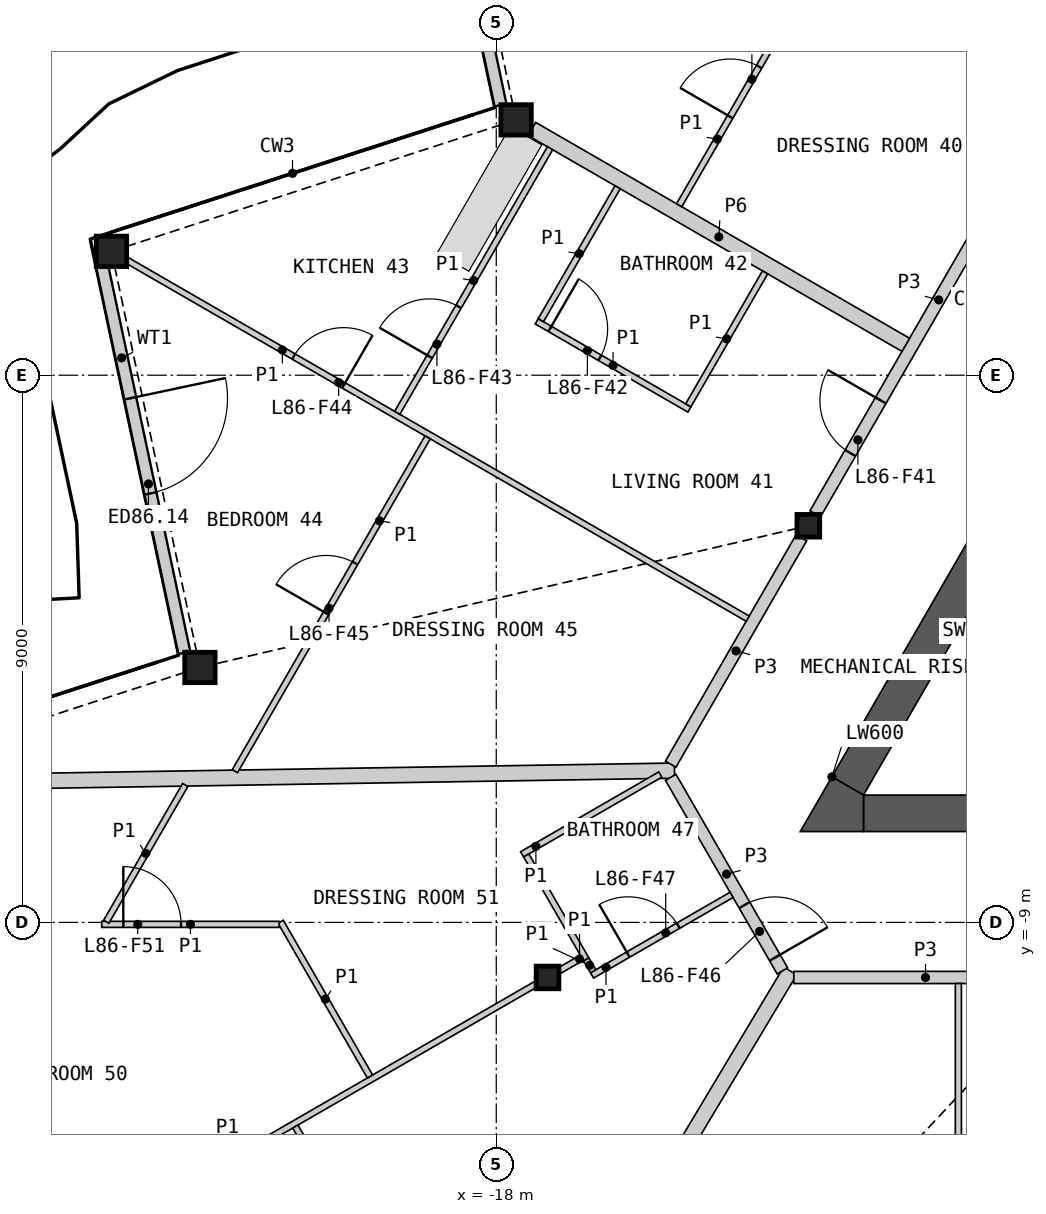
"""IFC4 building model, lengths in metres.
Left out: names, types, materials, properties, quantities, classifications, styles, units other than length and angle.
Written with IfcOpenShell. Run it as: python <this file> out.ifc"""

import sys

from ifc_helpers import new_model, si_unit, direction, frame, frame_2d, origin, origin_2d, place, context, subcontext, project, spatial, polyline, rectangle, hollow_rectangle, i_section, outline, extrude, element, fill, save


model = new_model("IFC4")
c1 = context("Model", 3, precision=1e-05, world=origin(), true_north=direction((0.0, 1.0)))
c2 = subcontext(c1, "Body", "Model", "MODEL_VIEW")
j1 = project(units=[si_unit("LENGTHUNIT", "METRE"), si_unit("PLANEANGLEUNIT", "RADIAN")], contexts=[c1])
p1 = place(None, origin())
s1 = spatial("IfcSite", under=j1, at=p1, CompositionType="ELEMENT")
p2 = place(p1, origin())
s2 = spatial("IfcBuilding", under=s1, at=p2, CompositionType="ELEMENT")
p3 = place(p2, frame((0.0, 0.0, 381.4)))
s3 = spatial("IfcBuildingStorey", under=s2, at=p3, CompositionType="ELEMENT", Elevation=381.4)
for number, where, z_axis, x_axis in (
    (1, (-17.674, 4.199, 0.0), (0.0, 0.0, 1.0), (1.0, 0.0, 0.0)),
    (2, (-24.329, 2.037, 0.0), (0.0, 0.0, 1.0), (1.0, 0.0, 0.0)),
    (3, (-22.874, -4.807, 0.0), (0.0, 0.0, 1.0), (1.0, 0.0, 0.0)),
):
    element("IfcColumn", number, at=place(p3, frame(where, z_axis=z_axis, x_axis=x_axis)), inside=s3, PredefinedType="COLUMN", context=c2, shape_type="SweptSolid", body=[
        extrude(hollow_rectangle(XDim=0.5, YDim=0.5, WallThickness=0.03, at=origin_2d()), origin(), (0.0, 0.0, 1.0), 3.4),
    ])
for number, where, z_axis, x_axis in (
    (4, (-12.868, -2.476, 0.0), (0.0, 0.0, 1.0), (1.0, 0.0, 0.0)),
    (5, (-17.157, -9.906, 0.0), (0.0, 0.0, 1.0), (1.0, 0.0, 0.0)),
):
    element("IfcColumn", number, at=place(p3, frame(where, z_axis=z_axis, x_axis=x_axis)), inside=s3, PredefinedType="COLUMN", context=c2, shape_type="SweptSolid", body=[
        extrude(i_section(OverallWidth=0.374, OverallDepth=0.372, WebThickness=0.016, FlangeThickness=0.026, at=origin_2d()), origin(), (0.0, 0.0, 1.0), 3.4),
    ])
p4 = place(p3, frame((-19.304, 10.909, 0.0), z_axis=(0.0, 0.0, 1.0), x_axis=(0.207882161022, -0.97815387702, 0.0)))
e6 = element("IfcWall", 6, at=p4, inside=s3, PredefinedType="SOLIDWALL", context=c2, shape_type="SweptSolid", body=[
    extrude(rectangle(XDim=6.612, YDim=0.2, at=frame_2d((3.306, 0.0))), origin(), (0.0, 0.0, 1.0), 2.634),
])
p5 = place(p4, frame((2.333, 0.0, 0.0)))
e7 = element("IfcOpeningElement", 7, at=p5, cuts=e6, PredefinedType="OPENING", context=c2, shape_type="SweptSolid", body=[
    extrude(rectangle(XDim=1.6, YDim=2.25, at=frame_2d((0.8, 1.125))), frame((0.0, 0.11, 0.0), z_axis=(0.0, -1.0, 0.0), x_axis=(1.0, 0.0, 0.0)), (0.0, 0.0, 1.0), 0.22),
])
p6 = place(p3, frame((-24.505, 1.902, 0.0), z_axis=(0.0, 0.0, 1.0), x_axis=(0.207917488951, -0.978146368285, 0.0)))
e8 = element("IfcWall", 8, at=p6, inside=s3, PredefinedType="SOLIDWALL", context=c2, shape_type="SweptSolid", body=[
    extrude(rectangle(XDim=6.612, YDim=0.2, at=frame_2d((3.306, 0.0))), origin(), (0.0, 0.0, 1.0), 2.634),
])
p7 = place(p6, frame((2.333, 0.0, 0.0)))
e9 = element("IfcOpeningElement", 9, at=p7, cuts=e8, PredefinedType="OPENING", context=c2, shape_type="SweptSolid", body=[
    extrude(rectangle(XDim=1.6, YDim=2.25, at=frame_2d((0.8, 1.125))), frame((0.0, 0.11, 0.0), z_axis=(0.0, -1.0, 0.0), x_axis=(1.0, 0.0, 0.0)), (0.0, 0.0, 1.0), 0.22),
])
p8 = place(p3, origin())
e10 = element("IfcWall", 10, at=p8, inside=s3, PredefinedType="SHEAR", context=c2, shape_type="SweptSolid", body=[
    extrude(outline(polyline([(-5.307, -1.281), (-10.374, -4.206), (-10.032, -4.298), (-5.182, -1.498), (-5.307, -1.281)])), origin(), (0.0, 0.0, 1.0), 3.1),
])
p9 = place(p3, origin())
e11 = element("IfcWall", 11, at=p9, inside=s3, PredefinedType="SHEAR", context=c2, shape_type="SweptSolid", body=[
    extrude(outline(polyline([(-10.374, -4.206), (-8.83, -6.881), (-8.738, -6.539), (-10.032, -4.298), (-10.374, -4.206)])), origin(), (0.0, 0.0, 1.0), 3.1),
])
p10 = place(p3, frame((-11.961, -7.206, 0.0), z_axis=(0.0, 0.0, 1.0), x_axis=(1.0, 0.0, 0.0)))
e12 = element("IfcWall", 12, at=p10, inside=s3, PredefinedType="SHEAR", context=c2, shape_type="SweptSolid", body=[
    extrude(rectangle(XDim=4.868, YDim=0.6, at=frame_2d((2.434, 0.0))), origin(), (0.0, 0.0, 1.0), 3.1),
])
p11 = place(p3, frame((-9.562, -2.15, 0.0), z_axis=(0.0, 0.0, 1.0), x_axis=(-0.500015214976, -0.866016619236, 0.0)))
e13 = element("IfcWall", 13, at=p11, inside=s3, PredefinedType="SHEAR", context=c2, shape_type="SweptSolid", body=[
    extrude(rectangle(XDim=5.318, YDim=0.6, at=frame_2d((2.659, 0.0))), origin(), (0.0, 0.0, 1.0), 3.1),
])
p12 = place(p3, origin())
e14 = element("IfcWall", 14, at=p12, inside=s3, PredefinedType="SHEAR", context=c2, shape_type="SweptSolid", body=[
    extrude(outline(polyline([(-12.48, -6.606), (-11.961, -6.906), (-11.961, -7.506), (-13.0, -7.506), (-12.48, -6.606)])), origin(), (0.0, 0.0, 1.0), 3.1),
])
p13 = place(p3, frame((-20.338, -21.771, 0.0), z_axis=(0.0, 0.0, 1.0), x_axis=(0.513878217441, 0.857863146218, 0.0)))
e15 = element("IfcWall", 15, at=p13, inside=s3, PredefinedType="PARTITIONING", context=c2, shape_type="SweptSolid", body=[
    extrude(rectangle(XDim=13.956, YDim=0.25, at=frame_2d((6.978, 0.0))), origin(), (0.0, 0.0, 1.0), 2.33),
])
p14 = place(p3, frame((-29.269, -6.732, 0.0), z_axis=(0.0, 0.0, 1.0), x_axis=(0.999870533117, 0.016090898164, 0.0)))
e16 = element("IfcWall", 16, at=p14, inside=s3, PredefinedType="PARTITIONING", context=c2, shape_type="SweptSolid", body=[
    extrude(rectangle(XDim=14.202, YDim=0.25, at=frame_2d((7.101, 0.0))), origin(), (0.0, 0.0, 1.0), 2.33),
])
p15 = place(p3, frame((-12.754, -2.279, 0.0), z_axis=(0.0, 0.0, 1.0), x_axis=(0.500001682468, 0.866024432409, 0.0)))
e17 = element("IfcWall", 17, at=p15, inside=s3, PredefinedType="PARTITIONING", context=c2, shape_type="SweptSolid", body=[
    extrude(rectangle(XDim=8.124, YDim=0.2, at=frame_2d((4.062, 0.0))), origin(), (0.0, 0.0, 1.0), 3.1),
])
p16 = place(p15, frame((1.153, 0.0, 0.0)))
e18 = element("IfcOpeningElement", 18, at=p16, cuts=e17, PredefinedType="OPENING", context=c2, shape_type="SweptSolid", body=[
    extrude(rectangle(XDim=1.0, YDim=2.1, at=frame_2d((0.5, 1.05))), frame((0.0, 0.11, 0.0), z_axis=(0.0, -1.0, 0.0), x_axis=(1.0, 0.0, 0.0)), (0.0, 0.0, 1.0), 0.22),
])
p17 = place(p3, frame((-17.414, 4.049, 0.0), z_axis=(0.0, 0.0, 1.0), x_axis=(0.866033839264, -0.499985389037, 0.0)))
e19 = element("IfcWall", 19, at=p17, inside=s3, PredefinedType="PARTITIONING", context=c2, shape_type="SweptSolid", body=[
    extrude(rectangle(XDim=7.1, YDim=0.25, at=frame_2d((3.55, 0.0))), origin(), (0.0, 0.0, 1.0), 2.33),
])
p18 = place(p3, frame((-13.106, -9.906, 0.0), z_axis=(0.0, 0.0, 1.0), x_axis=(1.0, 0.0, 0.0)))
e20 = element("IfcWall", 20, at=p18, inside=s3, PredefinedType="PARTITIONING", context=c2, shape_type="SweptSolid", body=[
    extrude(rectangle(XDim=4.331, YDim=0.2, at=frame_2d((2.165, 0.0))), origin(), (0.0, 0.0, 1.0), 3.1),
])
p19 = place(p3, frame((-15.131, -6.397, 0.0), z_axis=(0.0, 0.0, 1.0), x_axis=(0.499986217557, 0.866033360935, 0.0)))
e21 = element("IfcWall", 21, at=p19, inside=s3, PredefinedType="PARTITIONING", context=c2, shape_type="SweptSolid", body=[
    extrude(rectangle(XDim=4.3, YDim=0.2, at=frame_2d((2.15, 0.0))), origin(), (0.0, 0.0, 1.0), 3.1),
])
p20 = place(p3, frame((-15.131, -6.614, 0.0), z_axis=(0.0, 0.0, 1.0), x_axis=(0.499967746641, -0.866044024469, 0.0)))
e22 = element("IfcWall", 22, at=p20, inside=s3, PredefinedType="PARTITIONING", context=c2, shape_type="SweptSolid", body=[
    extrude(rectangle(XDim=3.676, YDim=0.2, at=frame_2d((1.838, 0.0))), origin(), (0.0, 0.0, 1.0), 3.1),
])
p21 = place(p20, frame((2.426, 0.0, 0.0)))
e23 = element("IfcOpeningElement", 23, at=p21, cuts=e22, PredefinedType="OPENING", context=c2, shape_type="SweptSolid", body=[
    extrude(rectangle(XDim=1.0, YDim=2.1, at=frame_2d((0.5, 1.05))), frame((0.0, 0.11, 0.0), z_axis=(0.0, -1.0, 0.0), x_axis=(1.0, 0.0, 0.0)), (0.0, 0.0, 1.0), 0.22),
])
p22 = place(p3, frame((-10.4, -21.828, 0.0), z_axis=(0.0, 0.0, 1.0), x_axis=(0.0, 1.0, 0.0)))
e24 = element("IfcWall", 24, at=p22, inside=s3, PredefinedType="PARTITIONING", context=c2, shape_type="SweptSolid", body=[
    extrude(rectangle(XDim=11.822, YDim=0.1, at=frame_2d((5.911, 0.0))), origin(), (0.0, 0.0, 1.0), 2.33),
])
p23 = place(p22, frame((1.156, 0.0, 0.0)))
e25 = element("IfcOpeningElement", 25, at=p23, cuts=e24, PredefinedType="OPENING", context=c2, shape_type="SweptSolid", body=[
    extrude(rectangle(XDim=0.95, YDim=2.1, at=frame_2d((0.475, 1.05))), frame((0.0, 0.06, 0.0), z_axis=(0.0, -1.0, 0.0), x_axis=(1.0, 0.0, 0.0)), (0.0, 0.0, 1.0), 0.12),
])
p24 = place(p3, frame((-24.069, 1.887, 0.0), z_axis=(0.0, 0.0, 1.0), x_axis=(0.866023404247, -0.500003463284, 0.0)))
e26 = element("IfcWall", 26, at=p24, inside=s3, PredefinedType="PARTITIONING", context=c2, shape_type="SweptSolid", body=[
    extrude(rectangle(XDim=11.782, YDim=0.1, at=frame_2d((5.891, 0.0))), origin(), (0.0, 0.0, 1.0), 2.33),
])
p25 = place(p24, frame((3.159, 0.0, 0.0)))
e27 = element("IfcOpeningElement", 27, at=p25, cuts=e26, PredefinedType="OPENING", context=c2, shape_type="SweptSolid", body=[
    extrude(rectangle(XDim=0.95, YDim=2.1, at=frame_2d((0.475, 1.05))), frame((0.0, 0.06, 0.0), z_axis=(0.0, -1.0, 0.0), x_axis=(1.0, 0.0, 0.0)), (0.0, 0.0, 1.0), 0.12),
])
p26 = place(p3, frame((-18.869, 10.894, 0.0), z_axis=(0.0, 0.0, 1.0), x_axis=(0.866023724155, -0.500002909193, 0.0)))
e28 = element("IfcWall", 28, at=p26, inside=s3, PredefinedType="PARTITIONING", context=c2, shape_type="SweptSolid", body=[
    extrude(rectangle(XDim=11.655, YDim=0.1, at=frame_2d((5.827, 0.0))), origin(), (0.0, 0.0, 1.0), 2.33),
])
p27 = place(p26, frame((6.253, 0.0, 0.0)))
e29 = element("IfcOpeningElement", 29, at=p27, cuts=e28, PredefinedType="OPENING", context=c2, shape_type="SweptSolid", body=[
    extrude(rectangle(XDim=0.95, YDim=2.1, at=frame_2d((0.475, 1.05))), frame((0.0, 0.06, 0.0), z_axis=(0.0, -1.0, 0.0), x_axis=(1.0, 0.0, 0.0)), (0.0, 0.0, 1.0), 0.12),
])
p28 = place(p3, frame((-26.777, -15.46, 0.0), z_axis=(0.0, 0.0, 1.0), x_axis=(0.866019680922, 0.500009912158, 0.0)))
e30 = element("IfcWall", 30, at=p28, inside=s3, PredefinedType="PARTITIONING", context=c2, shape_type="SweptSolid", body=[
    extrude(rectangle(XDim=10.881, YDim=0.1, at=frame_2d((5.44, 0.0))), origin(), (0.0, 0.0, 1.0), 2.33),
])
p29 = place(p28, frame((1.454, 0.0, 0.0)))
e31 = element("IfcOpeningElement", 31, at=p29, cuts=e30, PredefinedType="OPENING", context=c2, shape_type="SweptSolid", body=[
    extrude(rectangle(XDim=0.95, YDim=2.1, at=frame_2d((0.475, 1.05))), frame((0.0, 0.06, 0.0), z_axis=(0.0, -1.0, 0.0), x_axis=(1.0, 0.0, 0.0)), (0.0, 0.0, 1.0), 0.12),
])
p30 = place(p3, frame((-21.304, -12.358, 0.0), z_axis=(0.0, 0.0, 1.0), x_axis=(0.500000558108, -0.866025081561, 0.0)))
e32 = element("IfcWall", 32, at=p30, inside=s3, PredefinedType="PARTITIONING", context=c2, shape_type="SweptSolid", body=[
    extrude(rectangle(XDim=6.358, YDim=0.1, at=frame_2d((3.179, 0.0))), origin(), (0.0, 0.0, 1.0), 2.33),
])
p31 = place(p30, frame((3.555, 0.0, 0.0)))
e33 = element("IfcOpeningElement", 33, at=p31, cuts=e32, PredefinedType="OPENING", context=c2, shape_type="SweptSolid", body=[
    extrude(rectangle(XDim=0.95, YDim=2.1, at=frame_2d((0.475, 1.05))), frame((0.0, 0.06, 0.0), z_axis=(0.0, -1.0, 0.0), x_axis=(1.0, 0.0, 0.0)), (0.0, 0.0, 1.0), 0.12),
])
p32 = place(p3, frame((-22.298, -6.512, 0.0), z_axis=(0.0, 0.0, 1.0), x_axis=(0.499991387631, 0.866030376081, 0.0)))
e34 = element("IfcWall", 34, at=p32, inside=s3, PredefinedType="PARTITIONING", context=c2, shape_type="SweptSolid", body=[
    extrude(rectangle(XDim=6.339, YDim=0.1, at=frame_2d((3.169, 0.0))), origin(), (0.0, 0.0, 1.0), 2.33),
])
p33 = place(p32, frame((3.0, 0.0, 0.0)))
e35 = element("IfcOpeningElement", 35, at=p33, cuts=e34, PredefinedType="OPENING", context=c2, shape_type="SweptSolid", body=[
    extrude(rectangle(XDim=0.95, YDim=2.1, at=frame_2d((0.475, 1.05))), frame((0.0, 0.06, 0.0), z_axis=(0.0, -1.0, 0.0), x_axis=(1.0, 0.0, 0.0)), (0.0, 0.0, 1.0), 0.12),
])
p34 = place(p3, frame((-19.628, -0.619, 0.0), z_axis=(0.0, 0.0, 1.0), x_axis=(0.499990214365, 0.86603105345, 0.0)))
e36 = element("IfcWall", 36, at=p34, inside=s3, PredefinedType="PARTITIONING", context=c2, shape_type="SweptSolid", body=[
    extrude(rectangle(XDim=5.025, YDim=0.1, at=frame_2d((2.512, 0.0))), origin(), (0.0, 0.0, 1.0), 2.33),
])
p35 = place(p34, frame((1.067, 0.0, 0.0)))
e37 = element("IfcOpeningElement", 37, at=p35, cuts=e36, PredefinedType="OPENING", context=c2, shape_type="SweptSolid", body=[
    extrude(rectangle(XDim=0.95, YDim=2.1, at=frame_2d((0.475, 1.05))), frame((0.0, 0.06, 0.0), z_axis=(0.0, -1.0, 0.0), x_axis=(1.0, 0.0, 0.0)), (0.0, 0.0, 1.0), 0.12),
])
p36 = place(p3, frame((-14.992, 2.796, 0.0), z_axis=(0.0, 0.0, 1.0), x_axis=(0.499990214365, 0.86603105345, 0.0)))
e38 = element("IfcWall", 38, at=p36, inside=s3, PredefinedType="PARTITIONING", context=c2, shape_type="SweptSolid", body=[
    extrude(rectangle(XDim=5.025, YDim=0.1, at=frame_2d((2.512, 0.0))), origin(), (0.0, 0.0, 1.0), 2.33),
])
p37 = place(p36, frame((1.68, 0.0, 0.0)))
e39 = element("IfcOpeningElement", 39, at=p37, cuts=e38, PredefinedType="OPENING", context=c2, shape_type="SweptSolid", body=[
    extrude(rectangle(XDim=0.95, YDim=2.1, at=frame_2d((0.475, 1.05))), frame((0.0, 0.06, 0.0), z_axis=(0.0, -1.0, 0.0), x_axis=(1.0, 0.0, 0.0)), (0.0, 0.0, 1.0), 0.12),
])
p38 = place(p3, frame((-21.546, -8.989, 0.0), z_axis=(0.0, 0.0, 1.0), x_axis=(0.499919039967, -0.866072141036, 0.0)))
e40 = element("IfcWall", 40, at=p38, inside=s3, PredefinedType="PARTITIONING", context=c2, shape_type="SweptSolid", body=[
    extrude(rectangle(XDim=2.938, YDim=0.1, at=frame_2d((1.469, 0.0))), origin(), (0.0, 0.0, 1.0), 2.33),
])
p39 = place(p3, frame((-24.489, -9.032, 0.0), z_axis=(0.0, 0.0, 1.0), x_axis=(1.0, 0.0, 0.0)))
e41 = element("IfcWall", 41, at=p39, inside=s3, PredefinedType="PARTITIONING", context=c2, shape_type="SweptSolid", body=[
    extrude(rectangle(XDim=2.917, YDim=0.1, at=frame_2d((1.459, 0.0))), origin(), (0.0, 0.0, 1.0), 2.33),
])
p40 = place(p39, frame((0.355, 0.0, 0.0)))
e42 = element("IfcOpeningElement", 42, at=p40, cuts=e41, PredefinedType="OPENING", context=c2, shape_type="SweptSolid", body=[
    extrude(rectangle(XDim=0.95, YDim=2.1, at=frame_2d((0.475, 1.05))), frame((0.0, 0.06, 0.0), z_axis=(0.0, -1.0, 0.0), x_axis=(1.0, 0.0, 0.0)), (0.0, 0.0, 1.0), 0.12),
])
p41 = place(p3, frame((-17.335, 0.886, 0.0), z_axis=(0.0, 0.0, 1.0), x_axis=(0.866032775405, -0.499987231761, 0.0)))
e43 = element("IfcWall", 43, at=p41, inside=s3, PredefinedType="PARTITIONING", context=c2, shape_type="SweptSolid", body=[
    extrude(rectangle(XDim=2.9, YDim=0.1, at=frame_2d((1.45, 0.0))), origin(), (0.0, 0.0, 1.0), 2.33),
])
p42 = place(p41, frame((0.25, 0.0, 0.0)))
e44 = element("IfcOpeningElement", 44, at=p42, cuts=e43, PredefinedType="OPENING", context=c2, shape_type="SweptSolid", body=[
    extrude(rectangle(XDim=0.95, YDim=2.1, at=frame_2d((0.475, 1.05))), frame((0.0, 0.06, 0.0), z_axis=(0.0, -1.0, 0.0), x_axis=(1.0, 0.0, 0.0)), (0.0, 0.0, 1.0), 0.12),
])
p43 = place(p3, frame((-24.414, -8.989, 0.0), z_axis=(0.0, 0.0, 1.0), x_axis=(0.500042595688, 0.866000809756, 0.0)))
e45 = element("IfcWall", 45, at=p43, inside=s3, PredefinedType="PARTITIONING", context=c2, shape_type="SweptSolid", body=[
    extrude(rectangle(XDim=2.596, YDim=0.1, at=frame_2d((1.298, 0.0))), origin(), (0.0, 0.0, 1.0), 2.33),
])
p44 = place(p3, frame((-17.575, -7.881, 0.0), z_axis=(0.0, 0.0, 1.0), x_axis=(0.866036909293, 0.499980071345, 0.0)))
e46 = element("IfcWall", 46, at=p44, inside=s3, PredefinedType="PARTITIONING", context=c2, shape_type="SweptSolid", body=[
    extrude(rectangle(XDim=2.625, YDim=0.1, at=frame_2d((1.312, 0.0))), origin(), (0.0, 0.0, 1.0), 2.33),
])
p45 = place(p3, frame((-17.267, 0.905, 0.0), z_axis=(0.0, 0.0, 1.0), x_axis=(0.499976333282, 0.866039067339, 0.0)))
e47 = element("IfcWall", 47, at=p45, inside=s3, PredefinedType="PARTITIONING", context=c2, shape_type="SweptSolid", body=[
    extrude(rectangle(XDim=2.525, YDim=0.1, at=frame_2d((1.262, 0.0))), origin(), (0.0, 0.0, 1.0), 2.33),
])
p46 = place(p3, frame((-14.842, -0.496, 0.0), z_axis=(0.0, 0.0, 1.0), x_axis=(0.500048846702, 0.865997200291, 0.0)))
e48 = element("IfcWall", 48, at=p46, inside=s3, PredefinedType="PARTITIONING", context=c2, shape_type="SweptSolid", body=[
    extrude(rectangle(XDim=2.525, YDim=0.1, at=frame_2d((1.263, 0.0))), origin(), (0.0, 0.0, 1.0), 2.33),
])
p47 = place(p3, frame((-16.425, -9.872, 0.0), z_axis=(0.0, 0.0, 1.0), x_axis=(0.86603978909, 0.499975083092, 0.0)))
e49 = element("IfcWall", 49, at=p47, inside=s3, PredefinedType="PARTITIONING", context=c2, shape_type="SweptSolid", body=[
    extrude(rectangle(XDim=2.649, YDim=0.1, at=frame_2d((1.325, 0.0))), origin(), (0.0, 0.0, 1.0), 2.33),
])
p48 = place(p47, frame((0.686, 0.0, 0.0)))
e50 = element("IfcOpeningElement", 50, at=p48, cuts=e49, PredefinedType="OPENING", context=c2, shape_type="SweptSolid", body=[
    extrude(rectangle(XDim=0.95, YDim=2.1, at=frame_2d((0.475, 1.05))), frame((0.0, 0.06, 0.0), z_axis=(0.0, -1.0, 0.0), x_axis=(1.0, 0.0, 0.0)), (0.0, 0.0, 1.0), 0.12),
])
p49 = place(p3, frame((-17.507, -7.899, 0.0), z_axis=(0.0, 0.0, 1.0), x_axis=(0.500011643316, -0.866018681408, 0.0)))
e51 = element("IfcWall", 51, at=p49, inside=s3, PredefinedType="PARTITIONING", context=c2, shape_type="SweptSolid", body=[
    extrude(rectangle(XDim=1.973, YDim=0.1, at=frame_2d((0.987, 0.0))), origin(), (0.0, 0.0, 1.0), 2.33),
])
p50 = place(p3, frame((-16.96, -9.792, 0.0), z_axis=(0.0, 0.0, 1.0), x_axis=(0.866137484628, 0.499805820016, 0.0)))
e52 = element("IfcWall", 52, at=p50, inside=s3, PredefinedType="PARTITIONING", context=c2, shape_type="SweptSolid", body=[
    extrude(rectangle(XDim=0.423, YDim=0.1, at=frame_2d((0.211, 0.0))), origin(), (0.0, 0.0, 1.0), 2.33),
])
p51 = place(p3, frame((-16.519, -9.61, 0.0), z_axis=(0.0, 0.0, 1.0), x_axis=(0.50245032488, -0.864606078528, 0.0)))
e53 = element("IfcWall", 53, at=p51, inside=s3, PredefinedType="PARTITIONING", context=c2, shape_type="SweptSolid", body=[
    extrude(rectangle(XDim=0.224, YDim=0.1, at=frame_2d((0.112, 0.0))), origin(), (0.0, 0.0, 1.0), 2.33),
])
p52 = place(p7, origin())
e54 = element("IfcDoor", 54, at=p52, inside=s3, OperationType="DOUBLE_DOOR_SINGLE_SWING", PredefinedType="DOOR", context=c2, shape_type="SweptSolid", body=[
    extrude(rectangle(XDim=1.6, YDim=2.25, at=frame_2d((0.8, 1.125))), frame((0.0, 0.025, 0.0), z_axis=(0.0, -1.0, 0.0), x_axis=(1.0, 0.0, 0.0)), (0.0, 0.0, 1.0), 0.05),
])
fill(e9, e54)
p53 = place(p37, origin())
e55 = element("IfcDoor", 55, at=p53, inside=s3, OperationType="SINGLE_SWING_LEFT", PredefinedType="DOOR", context=c2, shape_type="SweptSolid", body=[
    extrude(rectangle(XDim=0.95, YDim=2.1, at=frame_2d((0.475, 1.05))), frame((0.0, 0.025, 0.0), z_axis=(0.0, -1.0, 0.0), x_axis=(1.0, 0.0, 0.0)), (0.0, 0.0, 1.0), 0.05),
])
fill(e39, e55)
p54 = place(p16, origin())
e56 = element("IfcDoor", 56, at=p54, inside=s3, OperationType="SINGLE_SWING_RIGHT", PredefinedType="DOOR", context=c2, shape_type="SweptSolid", body=[
    extrude(rectangle(XDim=1.0, YDim=2.1, at=frame_2d((0.5, 1.05))), frame((0.0, 0.025, 0.0), z_axis=(0.0, -1.0, 0.0), x_axis=(1.0, 0.0, 0.0)), (0.0, 0.0, 1.0), 0.05),
])
fill(e18, e56)
p55 = place(p42, origin())
e57 = element("IfcDoor", 57, at=p55, inside=s3, OperationType="SINGLE_SWING_LEFT", PredefinedType="DOOR", context=c2, shape_type="SweptSolid", body=[
    extrude(rectangle(XDim=0.95, YDim=2.1, at=frame_2d((0.475, 1.05))), frame((0.0, 0.025, 0.0), z_axis=(0.0, -1.0, 0.0), x_axis=(1.0, 0.0, 0.0)), (0.0, 0.0, 1.0), 0.05),
])
fill(e44, e57)
p56 = place(p35, origin())
e58 = element("IfcDoor", 58, at=p56, inside=s3, OperationType="SINGLE_SWING_LEFT", PredefinedType="DOOR", context=c2, shape_type="SweptSolid", body=[
    extrude(rectangle(XDim=0.95, YDim=2.1, at=frame_2d((0.475, 1.05))), frame((0.0, 0.025, 0.0), z_axis=(0.0, -1.0, 0.0), x_axis=(1.0, 0.0, 0.0)), (0.0, 0.0, 1.0), 0.05),
])
fill(e37, e58)
p57 = place(p25, origin())
e59 = element("IfcDoor", 59, at=p57, inside=s3, OperationType="SINGLE_SWING_RIGHT", PredefinedType="DOOR", context=c2, shape_type="SweptSolid", body=[
    extrude(rectangle(XDim=0.95, YDim=2.1, at=frame_2d((0.475, 1.05))), frame((0.0, 0.025, 0.0), z_axis=(0.0, -1.0, 0.0), x_axis=(1.0, 0.0, 0.0)), (0.0, 0.0, 1.0), 0.05),
])
fill(e27, e59)
p58 = place(p33, origin())
e60 = element("IfcDoor", 60, at=p58, inside=s3, OperationType="SINGLE_SWING_LEFT", PredefinedType="DOOR", context=c2, shape_type="SweptSolid", body=[
    extrude(rectangle(XDim=0.95, YDim=2.1, at=frame_2d((0.475, 1.05))), frame((0.0, 0.025, 0.0), z_axis=(0.0, -1.0, 0.0), x_axis=(1.0, 0.0, 0.0)), (0.0, 0.0, 1.0), 0.05),
])
fill(e35, e60)
p59 = place(p21, origin())
e61 = element("IfcDoor", 61, at=p59, inside=s3, OperationType="SINGLE_SWING_RIGHT", PredefinedType="DOOR", context=c2, shape_type="SweptSolid", body=[
    extrude(rectangle(XDim=1.0, YDim=2.1, at=frame_2d((0.5, 1.05))), frame((0.0, 0.025, 0.0), z_axis=(0.0, -1.0, 0.0), x_axis=(1.0, 0.0, 0.0)), (0.0, 0.0, 1.0), 0.05),
])
fill(e23, e61)
p60 = place(p48, origin())
e62 = element("IfcDoor", 62, at=p60, inside=s3, OperationType="SINGLE_SWING_LEFT", PredefinedType="DOOR", context=c2, shape_type="SweptSolid", body=[
    extrude(rectangle(XDim=0.95, YDim=2.1, at=frame_2d((0.475, 1.05))), frame((0.0, 0.025, 0.0), z_axis=(0.0, -1.0, 0.0), x_axis=(1.0, 0.0, 0.0)), (0.0, 0.0, 1.0), 0.05),
])
fill(e50, e62)
p61 = place(p40, origin())
e63 = element("IfcDoor", 63, at=p61, inside=s3, OperationType="SINGLE_SWING_LEFT", PredefinedType="DOOR", context=c2, shape_type="SweptSolid", body=[
    extrude(rectangle(XDim=0.95, YDim=2.1, at=frame_2d((0.475, 1.05))), frame((0.0, 0.025, 0.0), z_axis=(0.0, -1.0, 0.0), x_axis=(1.0, 0.0, 0.0)), (0.0, 0.0, 1.0), 0.05),
])
fill(e42, e63)
save(model, sys.argv[1])
